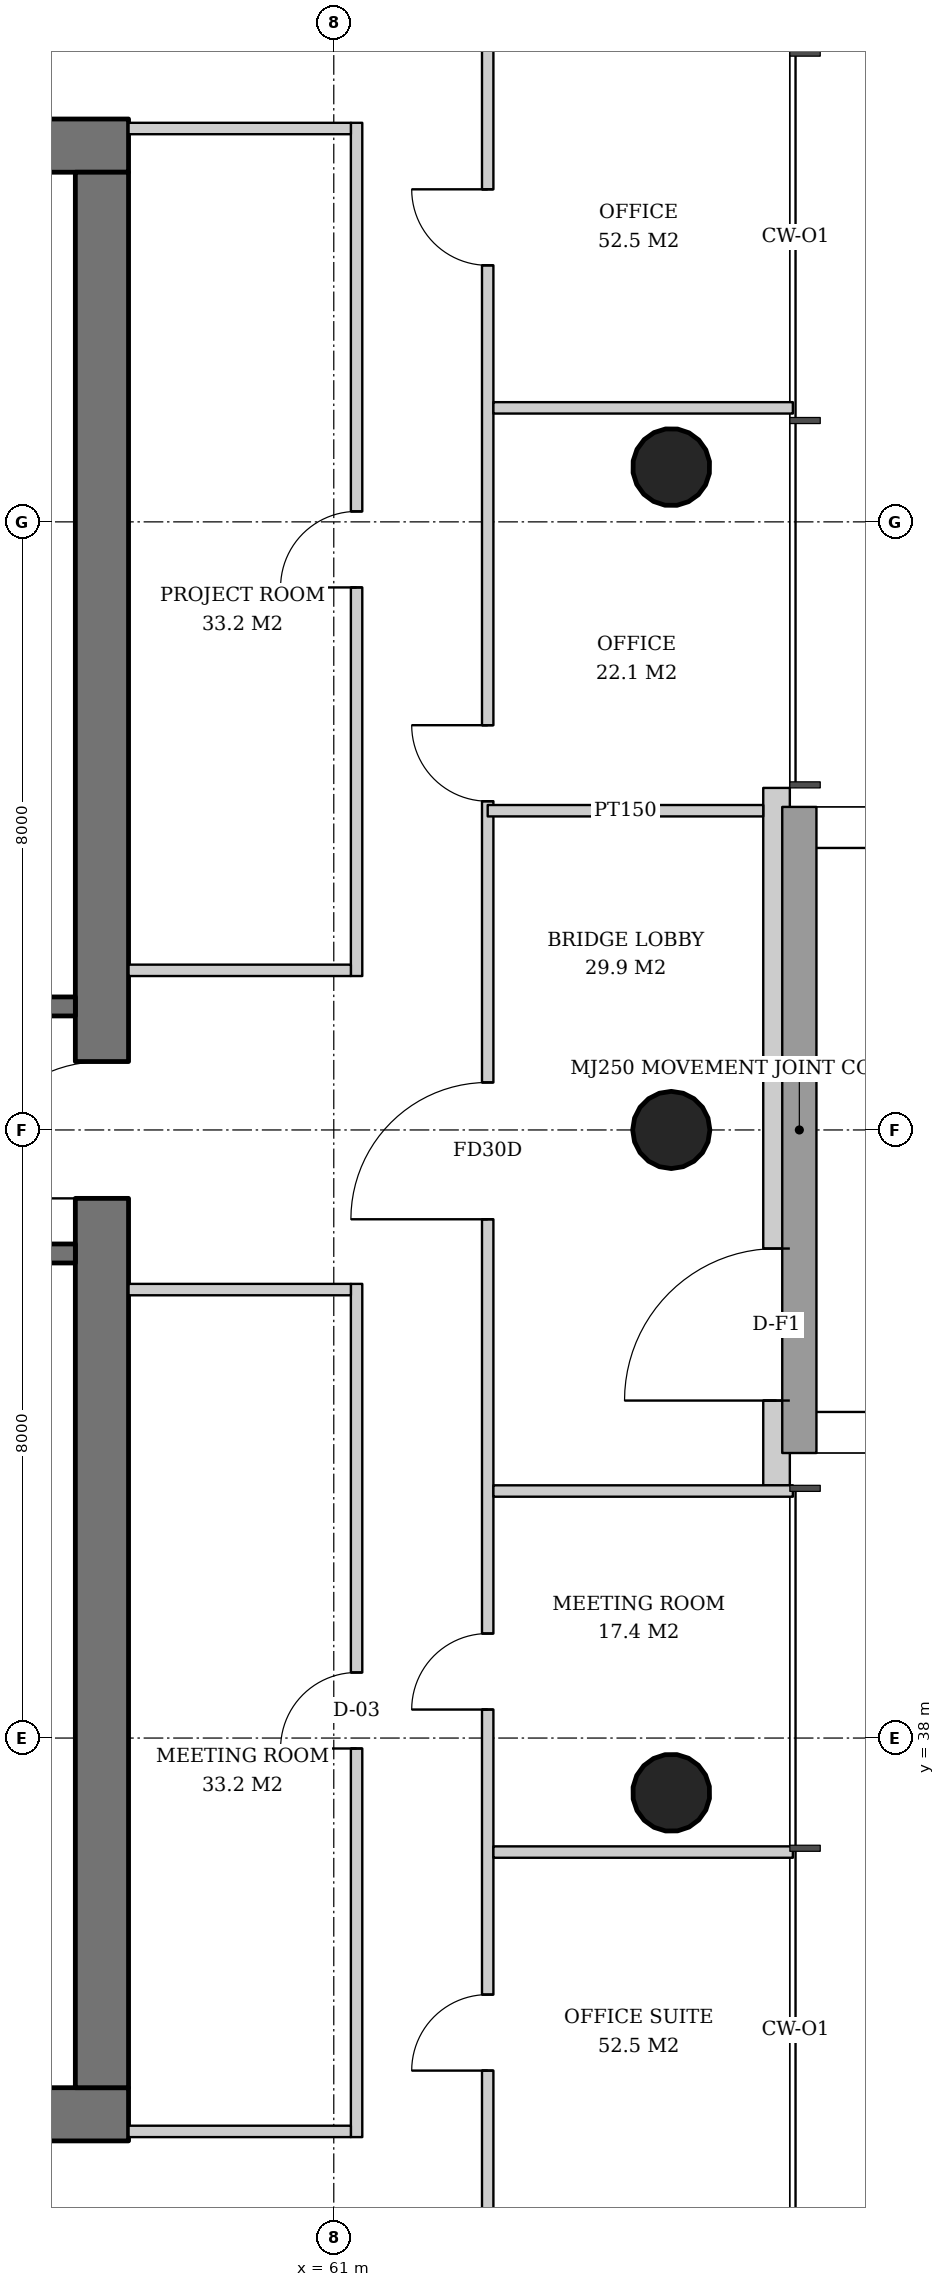
"""IFC4 building model, lengths in metres.
Left out: names, types, materials, properties, quantities, classifications, styles, units other than length and angle.
Written with IfcOpenShell. Run it as: python <this file> out.ifc"""

import sys

from ifc_helpers import new_model, si_unit, direction, frame, frame_2d, origin, origin_2d, place, context, subcontext, project, spatial, rectangle, hollow_circle, extrude, element, fill, save


model = new_model("IFC4")
c1 = context("Model", 3, precision=1e-05, world=origin(), true_north=direction((0.0, 1.0)))
c2 = subcontext(c1, "Body", "Model", "MODEL_VIEW")
j1 = project(units=[si_unit("LENGTHUNIT", "METRE"), si_unit("PLANEANGLEUNIT", "RADIAN")], contexts=[c1])
p1 = place(None, origin())
s1 = spatial("IfcSite", under=j1, at=p1, CompositionType="ELEMENT")
p2 = place(p1, origin())
s2 = spatial("IfcBuilding", under=s1, at=p2, CompositionType="ELEMENT")
p3 = place(p2, frame((0.0, 0.0, 131.2)))
s3 = spatial("IfcBuildingStorey", under=s2, at=p3, CompositionType="ELEMENT", Elevation=131.2)
p4 = place(p3, frame((65.479, 37.261, 0.0), z_axis=(-0.031910269556, 0.015987237665, 0.999362868496), x_axis=(-0.447933021895, -0.894067115991, 0.0)))
e1 = element("IfcColumn", 1, at=p4, inside=s3, PredefinedType="COLUMN", context=c2, shape_type="SweptSolid", body=[
    extrude(hollow_circle(Radius=0.508, WallThickness=0.04, at=origin_2d()), origin(), (0.0, 0.0, 1.0), 3.802),
])
p5 = place(p3, frame((65.479, 46.0, 0.0), z_axis=(-0.031914348339, 0.0, 0.999490607445), x_axis=(0.0, -1.0, 0.0)))
e2 = element("IfcColumn", 2, at=p5, inside=s3, PredefinedType="COLUMN", context=c2, shape_type="SweptSolid", body=[
    extrude(hollow_circle(Radius=0.508, WallThickness=0.04, at=origin_2d()), origin(), (0.0, 0.0, 1.0), 3.802),
])
p6 = place(p3, frame((65.479, 54.739, 0.0), z_axis=(-0.031910269556, -0.015987237665, 0.999362868496), x_axis=(0.447933021895, -0.894067115991, 0.0)))
e3 = element("IfcColumn", 3, at=p6, inside=s3, PredefinedType="COLUMN", context=c2, shape_type="SweptSolid", body=[
    extrude(hollow_circle(Radius=0.508, WallThickness=0.04, at=origin_2d()), origin(), (0.0, 0.0, 1.0), 3.802),
])
p7 = place(p3, frame((31.7, 33.05, 0.0), z_axis=(0.0, 0.0, 1.0), x_axis=(1.0, 0.0, 0.0)))
e4 = element("IfcWall", 4, at=p7, inside=s3, PredefinedType="SHEAR", context=c2, shape_type="SweptSolid", body=[
    extrude(rectangle(XDim=26.6, YDim=0.7, at=frame_2d((13.3, 0.0))), origin(), (0.0, 0.0, 1.0), 3.8),
])
p8 = place(p7, frame((7.3, 0.0, 0.0)))
e5 = element("IfcOpeningElement", 5, at=p8, cuts=e4, PredefinedType="OPENING", context=c2, shape_type="SweptSolid", body=[
    extrude(rectangle(XDim=1.0, YDim=2.1, at=frame_2d((0.5, 1.05))), frame((0.0, 0.36, 0.0), z_axis=(0.0, -1.0, 0.0), x_axis=(1.0, 0.0, 0.0)), (0.0, 0.0, 1.0), 0.72),
])
p9 = place(p7, frame((18.75, 0.0, 0.0)))
e6 = element("IfcOpeningElement", 6, at=p9, cuts=e4, PredefinedType="OPENING", context=c2, shape_type="SweptSolid", body=[
    extrude(rectangle(XDim=1.0, YDim=2.1, at=frame_2d((0.5, 1.05))), frame((0.0, 0.36, 0.0), z_axis=(0.0, -1.0, 0.0), x_axis=(1.0, 0.0, 0.0)), (0.0, 0.0, 1.0), 0.72),
])
p10 = place(p7, frame((3.2, 0.0, 0.0)))
e7 = element("IfcOpeningElement", 7, at=p10, cuts=e4, PredefinedType="OPENING", context=c2, shape_type="SweptSolid", body=[
    extrude(rectangle(XDim=1.0, YDim=2.1, at=frame_2d((0.5, 1.05))), frame((0.0, 0.36, 0.0), z_axis=(0.0, -1.0, 0.0), x_axis=(1.0, 0.0, 0.0)), (0.0, 0.0, 1.0), 0.72),
])
p11 = place(p7, frame((10.42, 0.0, 0.0)))
e8 = element("IfcOpeningElement", 8, at=p11, cuts=e4, PredefinedType="OPENING", context=c2, shape_type="SweptSolid", body=[
    extrude(rectangle(XDim=1.0, YDim=2.1, at=frame_2d((0.5, 1.05))), frame((0.0, 0.36, 0.0), z_axis=(0.0, -1.0, 0.0), x_axis=(1.0, 0.0, 0.0)), (0.0, 0.0, 1.0), 0.72),
])
p12 = place(p7, frame((14.46, 0.0, 0.0)))
e9 = element("IfcOpeningElement", 9, at=p12, cuts=e4, PredefinedType="OPENING", context=c2, shape_type="SweptSolid", body=[
    extrude(rectangle(XDim=1.0, YDim=2.1, at=frame_2d((0.5, 1.05))), frame((0.0, 0.36, 0.0), z_axis=(0.0, -1.0, 0.0), x_axis=(1.0, 0.0, 0.0)), (0.0, 0.0, 1.0), 0.72),
])
p13 = place(p7, frame((22.5, 0.0, 0.0)))
e10 = element("IfcOpeningElement", 10, at=p13, cuts=e4, PredefinedType="OPENING", context=c2, shape_type="SweptSolid", body=[
    extrude(rectangle(XDim=1.0, YDim=2.1, at=frame_2d((0.5, 1.05))), frame((0.0, 0.36, 0.0), z_axis=(0.0, -1.0, 0.0), x_axis=(1.0, 0.0, 0.0)), (0.0, 0.0, 1.0), 0.72),
])
p14 = place(p3, frame((31.7, 58.95, 0.0), z_axis=(0.0, 0.0, 1.0), x_axis=(1.0, 0.0, 0.0)))
e11 = element("IfcWall", 11, at=p14, inside=s3, PredefinedType="SHEAR", context=c2, shape_type="SweptSolid", body=[
    extrude(rectangle(XDim=26.6, YDim=0.7, at=frame_2d((13.3, 0.0))), origin(), (0.0, 0.0, 1.0), 3.8),
])
p15 = place(p14, frame((17.94, 0.0, 0.0)))
e12 = element("IfcOpeningElement", 12, at=p15, cuts=e11, PredefinedType="OPENING", context=c2, shape_type="SweptSolid", body=[
    extrude(rectangle(XDim=1.0, YDim=2.1, at=frame_2d((0.5, 1.05))), frame((0.0, 0.36, 0.0), z_axis=(0.0, -1.0, 0.0), x_axis=(1.0, 0.0, 0.0)), (0.0, 0.0, 1.0), 0.72),
])
p16 = place(p14, frame((5.825, 0.0, 0.0)))
e13 = element("IfcOpeningElement", 13, at=p16, cuts=e11, PredefinedType="OPENING", context=c2, shape_type="SweptSolid", body=[
    extrude(rectangle(XDim=1.0, YDim=2.1, at=frame_2d((0.5, 1.05))), frame((0.0, 0.36, 0.0), z_axis=(0.0, -1.0, 0.0), x_axis=(1.0, 0.0, 0.0)), (0.0, 0.0, 1.0), 0.72),
])
p17 = place(p14, frame((1.169, 0.0, 0.0)))
e14 = element("IfcOpeningElement", 14, at=p17, cuts=e11, PredefinedType="OPENING", context=c2, shape_type="SweptSolid", body=[
    extrude(rectangle(XDim=1.0, YDim=2.1, at=frame_2d((0.5, 1.05))), frame((0.0, 0.36, 0.0), z_axis=(0.0, -1.0, 0.0), x_axis=(1.0, 0.0, 0.0)), (0.0, 0.0, 1.0), 0.72),
])
p18 = place(p14, frame((3.447, 0.0, 0.0)))
e15 = element("IfcOpeningElement", 15, at=p18, cuts=e11, PredefinedType="OPENING", context=c2, shape_type="SweptSolid", body=[
    extrude(rectangle(XDim=1.0, YDim=2.1, at=frame_2d((0.5, 1.05))), frame((0.0, 0.36, 0.0), z_axis=(0.0, -1.0, 0.0), x_axis=(1.0, 0.0, 0.0)), (0.0, 0.0, 1.0), 0.72),
])
p19 = place(p14, frame((8.342, 0.0, 0.0)))
e16 = element("IfcOpeningElement", 16, at=p19, cuts=e11, PredefinedType="OPENING", context=c2, shape_type="SweptSolid", body=[
    extrude(rectangle(XDim=1.0, YDim=2.1, at=frame_2d((0.5, 1.05))), frame((0.0, 0.36, 0.0), z_axis=(0.0, -1.0, 0.0), x_axis=(1.0, 0.0, 0.0)), (0.0, 0.0, 1.0), 0.72),
])
p20 = place(p14, frame((11.626, 0.0, 0.0)))
e17 = element("IfcOpeningElement", 17, at=p20, cuts=e11, PredefinedType="OPENING", context=c2, shape_type="SweptSolid", body=[
    extrude(rectangle(XDim=1.0, YDim=2.1, at=frame_2d((0.5, 1.05))), frame((0.0, 0.36, 0.0), z_axis=(0.0, -1.0, 0.0), x_axis=(1.0, 0.0, 0.0)), (0.0, 0.0, 1.0), 0.72),
])
p21 = place(p14, frame((14.862, 0.0, 0.0)))
e18 = element("IfcOpeningElement", 18, at=p21, cuts=e11, PredefinedType="OPENING", context=c2, shape_type="SweptSolid", body=[
    extrude(rectangle(XDim=1.0, YDim=2.1, at=frame_2d((0.5, 1.05))), frame((0.0, 0.36, 0.0), z_axis=(0.0, -1.0, 0.0), x_axis=(1.0, 0.0, 0.0)), (0.0, 0.0, 1.0), 0.72),
])
p22 = place(p14, frame((20.9, 0.0, 0.0)))
e19 = element("IfcOpeningElement", 19, at=p22, cuts=e11, PredefinedType="OPENING", context=c2, shape_type="SweptSolid", body=[
    extrude(rectangle(XDim=1.0, YDim=2.1, at=frame_2d((0.5, 1.05))), frame((0.0, 0.36, 0.0), z_axis=(0.0, -1.0, 0.0), x_axis=(1.0, 0.0, 0.0)), (0.0, 0.0, 1.0), 0.72),
])
p23 = place(p14, frame((23.75, 0.0, 0.0)))
e20 = element("IfcOpeningElement", 20, at=p23, cuts=e11, PredefinedType="OPENING", context=c2, shape_type="SweptSolid", body=[
    extrude(rectangle(XDim=1.0, YDim=2.1, at=frame_2d((0.5, 1.05))), frame((0.0, 0.36, 0.0), z_axis=(0.0, -1.0, 0.0), x_axis=(1.0, 0.0, 0.0)), (0.0, 0.0, 1.0), 0.72),
])
p24 = place(p3, frame((57.95, 33.4, 0.0), z_axis=(0.0, 0.0, 1.0), x_axis=(0.0, 1.0, 0.0)))
e21 = element("IfcWall", 21, at=p24, inside=s3, PredefinedType="SHEAR", context=c2, shape_type="SweptSolid", body=[
    extrude(rectangle(XDim=25.2, YDim=0.7, at=frame_2d((12.6, 0.0))), origin(), (0.0, 0.0, 1.0), 3.8),
])
p25 = place(p24, frame((11.7, 0.0, 0.0)))
e22 = element("IfcOpeningElement", 22, at=p25, cuts=e21, PredefinedType="OPENING", context=c2, shape_type="SweptSolid", body=[
    extrude(rectangle(XDim=1.8, YDim=2.4, at=frame_2d((0.9, 1.2))), frame((0.0, 0.36, 0.0), z_axis=(0.0, -1.0, 0.0), x_axis=(1.0, 0.0, 0.0)), (0.0, 0.0, 1.0), 0.72),
])
p26 = place(p3, frame((66.825, 41.325, 0.0), z_axis=(0.0, 0.0, 1.0), x_axis=(0.0, 1.0, 0.0)))
e23 = element("IfcWall", 23, at=p26, inside=s3, PredefinedType="SOLIDWALL", context=c2, shape_type="SweptSolid", body=[
    extrude(rectangle(XDim=9.175, YDim=0.35, at=frame_2d((4.587, 0.0))), origin(), (0.0, 0.0, 1.0), 3.62),
])
p27 = place(p26, frame((1.115, 0.0, 0.0)))
e24 = element("IfcOpeningElement", 24, at=p27, cuts=e23, PredefinedType="OPENING", context=c2, shape_type="SweptSolid", body=[
    extrude(rectangle(XDim=2.0, YDim=2.4, at=frame_2d((1.0, 1.2))), frame((0.0, 0.185, 0.0), z_axis=(0.0, -1.0, 0.0), x_axis=(1.0, 0.0, 0.0)), (0.0, 0.0, 1.0), 0.37),
])
for number, where, z_axis, x_axis in (
    (25, (54.9, 44.375, 0.0), (0.0, 0.0, 1.0), (1.0, 0.0, 0.0)),
    (26, (54.9, 47.625, 0.0), (0.0, 0.0, 1.0), (1.0, 0.0, 0.0)),
):
    element("IfcWall", number, at=place(p3, frame(where, z_axis=z_axis, x_axis=x_axis)), inside=s3, PredefinedType="SOLIDWALL", context=c2, shape_type="SweptSolid", body=[
        extrude(rectangle(XDim=2.7, YDim=0.25, at=frame_2d((1.35, 0.0))), origin(), (0.0, 0.0, 1.0), 3.62),
    ])
p28 = place(p3, frame((61.3, 32.75, 0.0), z_axis=(0.0, 0.0, 1.0), x_axis=(0.0, 1.0, 0.0)))
e27 = element("IfcWall", 27, at=p28, inside=s3, PredefinedType="PARTITIONING", context=c2, shape_type="SweptSolid", body=[
    extrude(rectangle(XDim=11.225, YDim=0.15, at=frame_2d((5.613, 0.0))), origin(), (0.0, 0.0, 1.0), 2.72),
])
p29 = place(p28, frame((5.113, 0.0, 0.0)))
e28 = element("IfcOpeningElement", 28, at=p29, cuts=e27, PredefinedType="OPENING", context=c2, shape_type="SweptSolid", body=[
    extrude(rectangle(XDim=1.0, YDim=2.1, at=frame_2d((0.5, 1.05))), frame((0.0, 0.085, 0.0), z_axis=(0.0, -1.0, 0.0), x_axis=(1.0, 0.0, 0.0)), (0.0, 0.0, 1.0), 0.17),
])
p30 = place(p3, frame((58.3, 32.825, 0.0), z_axis=(0.0, 0.0, 1.0), x_axis=(1.0, 0.0, 0.0)))
e29 = element("IfcWall", 29, at=p30, inside=s3, PredefinedType="PARTITIONING", context=c2, shape_type="SweptSolid", body=[
    extrude(rectangle(XDim=2.925, YDim=0.15, at=frame_2d((1.462, 0.0))), origin(), (0.0, 0.0, 1.0), 2.72),
])
p31 = place(p3, frame((58.3, 43.9, 0.0), z_axis=(0.0, 0.0, 1.0), x_axis=(1.0, 0.0, 0.0)))
e30 = element("IfcWall", 30, at=p31, inside=s3, PredefinedType="PARTITIONING", context=c2, shape_type="SweptSolid", body=[
    extrude(rectangle(XDim=2.925, YDim=0.15, at=frame_2d((1.462, 0.0))), origin(), (0.0, 0.0, 1.0), 3.62),
])
p32 = place(p3, frame((61.3, 48.025, 0.0), z_axis=(0.0, 0.0, 1.0), x_axis=(0.0, 1.0, 0.0)))
e31 = element("IfcWall", 31, at=p32, inside=s3, PredefinedType="PARTITIONING", context=c2, shape_type="SweptSolid", body=[
    extrude(rectangle(XDim=11.225, YDim=0.15, at=frame_2d((5.613, 0.0))), origin(), (0.0, 0.0, 1.0), 2.806),
])
p33 = place(p32, frame((5.113, 0.0, 0.0)))
e32 = element("IfcOpeningElement", 32, at=p33, cuts=e31, PredefinedType="OPENING", context=c2, shape_type="SweptSolid", body=[
    extrude(rectangle(XDim=1.0, YDim=2.1, at=frame_2d((0.5, 1.05))), frame((0.0, 0.085, 0.0), z_axis=(0.0, -1.0, 0.0), x_axis=(1.0, 0.0, 0.0)), (0.0, 0.0, 1.0), 0.17),
])
for number, where, z_axis, x_axis in (
    (33, (58.3, 48.1, 0.0), (0.0, 0.0, 1.0), (1.0, 0.0, 0.0)),
    (34, (58.3, 59.175, 0.0), (0.0, 0.0, 1.0), (1.0, 0.0, 0.0)),
):
    element("IfcWall", number, at=place(p3, frame(where, z_axis=z_axis, x_axis=x_axis)), inside=s3, PredefinedType="PARTITIONING", context=c2, shape_type="SweptSolid", body=[
        extrude(rectangle(XDim=2.925, YDim=0.15, at=frame_2d((1.462, 0.0))), origin(), (0.0, 0.0, 1.0), 3.62),
    ])
p34 = place(p3, frame((63.025, 29.888, 0.0), z_axis=(0.0, 0.0, 1.0), x_axis=(0.0, 1.0, 0.0)))
e35 = element("IfcWall", 35, at=p34, inside=s3, PredefinedType="PARTITIONING", context=c2, shape_type="SweptSolid", body=[
    extrude(rectangle(XDim=32.223, YDim=0.15, at=frame_2d((16.112, 0.0))), origin(), (0.0, 0.0, 1.0), 2.72),
])
p35 = place(p34, frame((3.737, 0.0, 0.0)))
e36 = element("IfcOpeningElement", 36, at=p35, cuts=e35, PredefinedType="OPENING", context=c2, shape_type="SweptSolid", body=[
    extrude(rectangle(XDim=1.0, YDim=2.1, at=frame_2d((0.5, 1.05))), frame((0.0, 0.085, 0.0), z_axis=(0.0, -1.0, 0.0), x_axis=(1.0, 0.0, 0.0)), (0.0, 0.0, 1.0), 0.17),
])
p36 = place(p34, frame((8.487, 0.0, 0.0)))
e37 = element("IfcOpeningElement", 37, at=p36, cuts=e35, PredefinedType="OPENING", context=c2, shape_type="SweptSolid", body=[
    extrude(rectangle(XDim=1.0, YDim=2.1, at=frame_2d((0.5, 1.05))), frame((0.0, 0.085, 0.0), z_axis=(0.0, -1.0, 0.0), x_axis=(1.0, 0.0, 0.0)), (0.0, 0.0, 1.0), 0.17),
])
p37 = place(p34, frame((14.937, 0.0, 0.0)))
e38 = element("IfcOpeningElement", 38, at=p37, cuts=e35, PredefinedType="OPENING", context=c2, shape_type="SweptSolid", body=[
    extrude(rectangle(XDim=1.8, YDim=2.4, at=frame_2d((0.9, 1.2))), frame((0.0, 0.085, 0.0), z_axis=(0.0, -1.0, 0.0), x_axis=(1.0, 0.0, 0.0)), (0.0, 0.0, 1.0), 0.17),
])
p38 = place(p34, frame((20.437, 0.0, 0.0)))
e39 = element("IfcOpeningElement", 39, at=p38, cuts=e35, PredefinedType="OPENING", context=c2, shape_type="SweptSolid", body=[
    extrude(rectangle(XDim=1.0, YDim=2.1, at=frame_2d((0.5, 1.05))), frame((0.0, 0.085, 0.0), z_axis=(0.0, -1.0, 0.0), x_axis=(1.0, 0.0, 0.0)), (0.0, 0.0, 1.0), 0.17),
])
p39 = place(p34, frame((27.487, 0.0, 0.0)))
e40 = element("IfcOpeningElement", 40, at=p39, cuts=e35, PredefinedType="OPENING", context=c2, shape_type="SweptSolid", body=[
    extrude(rectangle(XDim=1.0, YDim=2.1, at=frame_2d((0.5, 1.05))), frame((0.0, 0.085, 0.0), z_axis=(0.0, -1.0, 0.0), x_axis=(1.0, 0.0, 0.0)), (0.0, 0.0, 1.0), 0.17),
])
for number, where, z_axis, x_axis in (
    (41, (63.1, 36.5, 0.0), (0.0, 0.0, 1.0), (1.0, 0.0, 0.0)),
    (42, (63.1, 41.25, 0.0), (0.0, 0.0, 1.0), (1.0, 0.0, 0.0)),
    (43, (63.1, 55.5, 0.0), (0.0, 0.0, 1.0), (1.0, 0.0, 0.0)),
):
    element("IfcWall", number, at=place(p3, frame(where, z_axis=z_axis, x_axis=x_axis)), inside=s3, PredefinedType="PARTITIONING", context=c2, shape_type="SweptSolid", body=[
        extrude(rectangle(XDim=3.94, YDim=0.15, at=frame_2d((1.97, 0.0))), origin(), (0.0, 0.0, 1.0), 2.82),
    ])
p40 = place(p3, frame((63.025, 50.2, 0.0), z_axis=(0.0, 0.0, 1.0), x_axis=(1.0, 0.0, 0.0)))
e44 = element("IfcWall", 44, at=p40, inside=s3, PredefinedType="PARTITIONING", context=c2, shape_type="SweptSolid", body=[
    extrude(rectangle(XDim=3.625, YDim=0.15, at=frame_2d((1.812, 0.0))), origin(), (0.0, 0.0, 1.0), 2.82),
])
p41 = place(p27, origin())
e45 = element("IfcDoor", 45, at=p41, inside=s3, OperationType="DOUBLE_DOOR_SINGLE_SWING", PredefinedType="DOOR", context=c2, shape_type="SweptSolid", body=[
    extrude(rectangle(XDim=2.0, YDim=2.4, at=frame_2d((1.0, 1.2))), frame((0.0, 0.025, 0.0), z_axis=(0.0, -1.0, 0.0), x_axis=(1.0, 0.0, 0.0)), (0.0, 0.0, 1.0), 0.05),
])
fill(e24, e45)
p42 = place(p25, origin())
e46 = element("IfcDoor", 46, at=p42, inside=s3, OperationType="DOUBLE_DOOR_SINGLE_SWING", PredefinedType="DOOR", context=c2, shape_type="SweptSolid", body=[
    extrude(rectangle(XDim=1.8, YDim=2.4, at=frame_2d((0.9, 1.2))), frame((0.0, 0.025, 0.0), z_axis=(0.0, -1.0, 0.0), x_axis=(1.0, 0.0, 0.0)), (0.0, 0.0, 1.0), 0.05),
])
fill(e22, e46)
p43 = place(p29, origin())
e47 = element("IfcDoor", 47, at=p43, inside=s3, OperationType="SINGLE_SWING_LEFT", PredefinedType="DOOR", context=c2, shape_type="SweptSolid", body=[
    extrude(rectangle(XDim=1.0, YDim=2.1, at=frame_2d((0.5, 1.05))), frame((0.0, 0.025, 0.0), z_axis=(0.0, -1.0, 0.0), x_axis=(1.0, 0.0, 0.0)), (0.0, 0.0, 1.0), 0.05),
])
fill(e28, e47)
p44 = place(p33, origin())
e48 = element("IfcDoor", 48, at=p44, inside=s3, OperationType="SINGLE_SWING_LEFT", PredefinedType="DOOR", context=c2, shape_type="SweptSolid", body=[
    extrude(rectangle(XDim=1.0, YDim=2.1, at=frame_2d((0.5, 1.05))), frame((0.0, 0.025, 0.0), z_axis=(0.0, -1.0, 0.0), x_axis=(1.0, 0.0, 0.0)), (0.0, 0.0, 1.0), 0.05),
])
fill(e32, e48)
p45 = place(p35, origin())
e49 = element("IfcDoor", 49, at=p45, inside=s3, OperationType="SINGLE_SWING_LEFT", PredefinedType="DOOR", context=c2, shape_type="SweptSolid", body=[
    extrude(rectangle(XDim=1.0, YDim=2.1, at=frame_2d((0.5, 1.05))), frame((0.0, 0.025, 0.0), z_axis=(0.0, -1.0, 0.0), x_axis=(1.0, 0.0, 0.0)), (0.0, 0.0, 1.0), 0.05),
])
fill(e36, e49)
p46 = place(p36, origin())
e50 = element("IfcDoor", 50, at=p46, inside=s3, OperationType="SINGLE_SWING_LEFT", PredefinedType="DOOR", context=c2, shape_type="SweptSolid", body=[
    extrude(rectangle(XDim=1.0, YDim=2.1, at=frame_2d((0.5, 1.05))), frame((0.0, 0.025, 0.0), z_axis=(0.0, -1.0, 0.0), x_axis=(1.0, 0.0, 0.0)), (0.0, 0.0, 1.0), 0.05),
])
fill(e37, e50)
p47 = place(p37, origin())
e51 = element("IfcDoor", 51, at=p47, inside=s3, OperationType="DOUBLE_DOOR_SINGLE_SWING", PredefinedType="DOOR", context=c2, shape_type="SweptSolid", body=[
    extrude(rectangle(XDim=1.8, YDim=2.4, at=frame_2d((0.9, 1.2))), frame((0.0, 0.025, 0.0), z_axis=(0.0, -1.0, 0.0), x_axis=(1.0, 0.0, 0.0)), (0.0, 0.0, 1.0), 0.05),
])
fill(e38, e51)
p48 = place(p38, origin())
e52 = element("IfcDoor", 52, at=p48, inside=s3, OperationType="SINGLE_SWING_RIGHT", PredefinedType="DOOR", context=c2, shape_type="SweptSolid", body=[
    extrude(rectangle(XDim=1.0, YDim=2.1, at=frame_2d((0.5, 1.05))), frame((0.0, 0.025, 0.0), z_axis=(0.0, -1.0, 0.0), x_axis=(1.0, 0.0, 0.0)), (0.0, 0.0, 1.0), 0.05),
])
fill(e39, e52)
p49 = place(p39, origin())
e53 = element("IfcDoor", 53, at=p49, inside=s3, OperationType="SINGLE_SWING_RIGHT", PredefinedType="DOOR", context=c2, shape_type="SweptSolid", body=[
    extrude(rectangle(XDim=1.0, YDim=2.1, at=frame_2d((0.5, 1.05))), frame((0.0, 0.025, 0.0), z_axis=(0.0, -1.0, 0.0), x_axis=(1.0, 0.0, 0.0)), (0.0, 0.0, 1.0), 0.05),
])
fill(e40, e53)
save(model, sys.argv[1])
